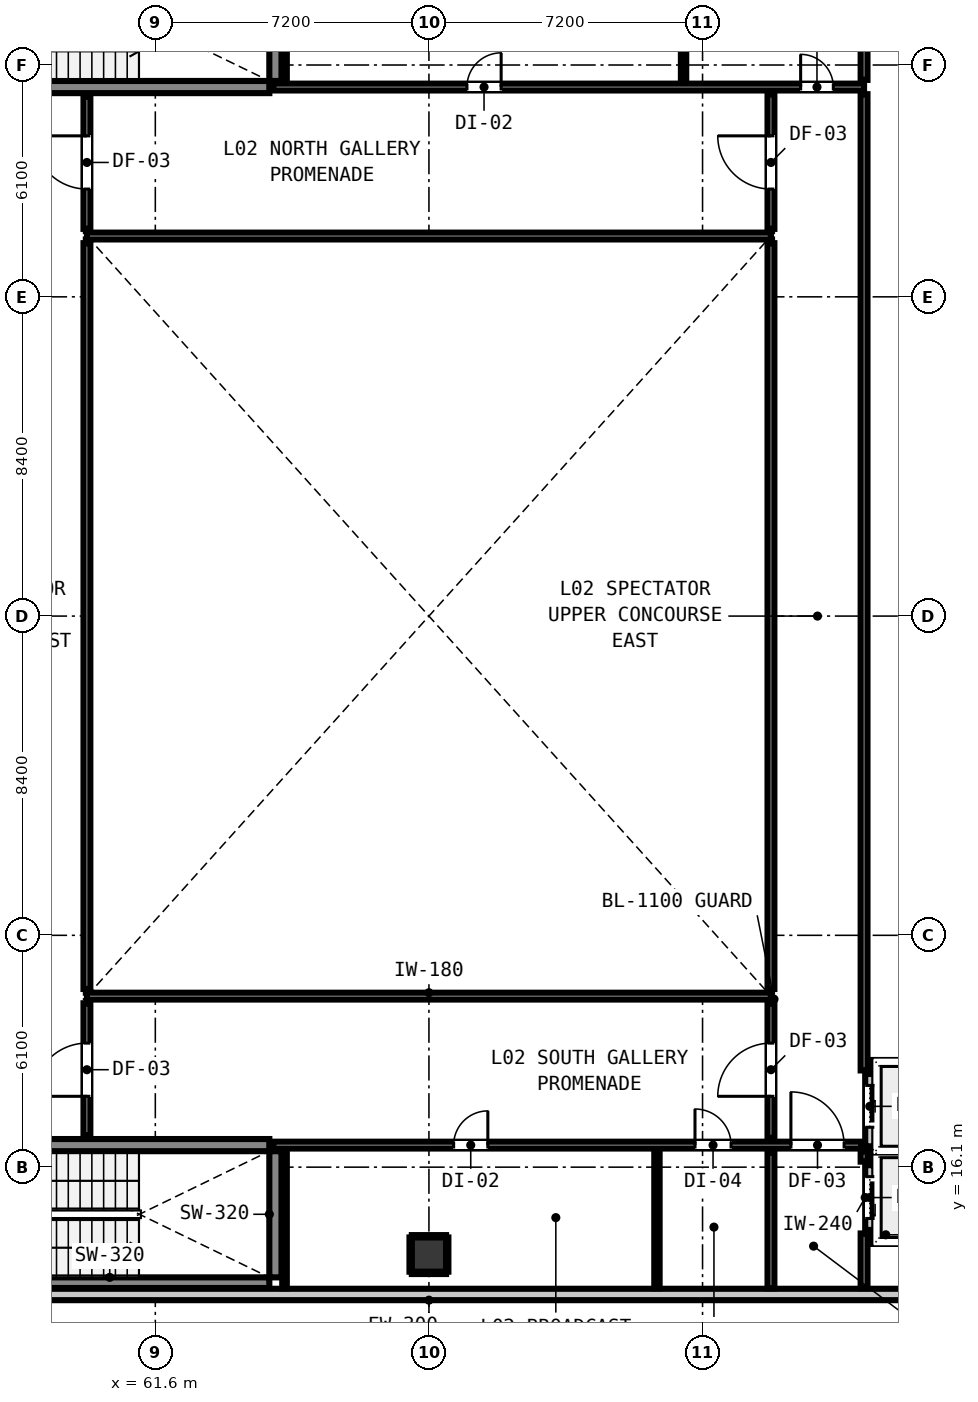
"""IFC4 building model, lengths in metres.
Left out: names, types, materials, properties, quantities, classifications, styles, units other than length and angle.
Written with IfcOpenShell. Run it as: python <this file> out.ifc"""

import sys

from ifc_helpers import new_model, si_unit, direction, frame, frame_2d, origin, origin_2d, place, context, subcontext, project, spatial, rectangle, circle, extrude, element, fill, save


model = new_model("IFC4")
c1 = context("Model", 3, precision=1e-05, world=origin(), true_north=direction((0.0, 1.0)))
c2 = subcontext(c1, "Body", "Model", "MODEL_VIEW")
j1 = project(units=[si_unit("LENGTHUNIT", "METRE"), si_unit("PLANEANGLEUNIT", "RADIAN")], contexts=[c1])
p1 = place(None, origin())
s1 = spatial("IfcSite", under=j1, at=p1, CompositionType="ELEMENT")
p2 = place(p1, origin())
s2 = spatial("IfcBuilding", under=s1, at=p2, CompositionType="ELEMENT")
p3 = place(p2, frame((0.0, 0.0, 9.4)))
s3 = spatial("IfcBuildingStorey", under=s2, at=p3, CompositionType="ELEMENT", Elevation=9.4)
p4 = place(p3, frame((64.76, 13.2, 0.0), z_axis=(0.0, 0.0, 1.0), x_axis=(0.0, 1.0, 0.0)))
e1 = element("IfcWall", 1, at=p4, inside=s3, PredefinedType="SHEAR", context=c2, shape_type="SweptSolid", body=[
    extrude(rectangle(XDim=3.32, YDim=0.32, at=frame_2d((1.66, 0.0))), origin(), (0.0, 0.0, 1.0), 4.2),
])
p5 = place(p3, frame((56.2, 13.06, 0.0), z_axis=(0.0, 0.0, 1.0), x_axis=(1.0, 0.0, 0.0)))
e2 = element("IfcWall", 2, at=p5, inside=s3, PredefinedType="SHEAR", context=c2, shape_type="SweptSolid", body=[
    extrude(rectangle(XDim=8.4, YDim=0.28, at=frame_2d((4.2, 0.0))), origin(), (0.0, 0.0, 1.0), 4.2),
])
p6 = place(p3, frame((56.2, 16.68, 0.0), z_axis=(0.0, 0.0, 1.0), x_axis=(1.0, 0.0, 0.0)))
e3 = element("IfcWall", 3, at=p6, inside=s3, PredefinedType="SHEAR", context=c2, shape_type="SweptSolid", body=[
    extrude(rectangle(XDim=8.4, YDim=0.32, at=frame_2d((4.2, 0.0))), origin(), (0.0, 0.0, 1.0), 4.2),
])
p7 = place(p6, frame((0.23, 0.0, 0.0)))
e4 = element("IfcOpeningElement", 4, at=p7, cuts=e3, PredefinedType="OPENING", context=c2, shape_type="SweptSolid", body=[
    extrude(rectangle(XDim=1.1, YDim=2.15, at=frame_2d((0.55, 1.075))), frame((0.0, 0.17, 0.0), z_axis=(0.0, -1.0, 0.0), x_axis=(1.0, 0.0, 0.0)), (0.0, 0.0, 1.0), 0.34),
])
p8 = place(p3, frame((64.76, 44.68, 0.0), z_axis=(0.0, 0.0, 1.0), x_axis=(0.0, 1.0, 0.0)))
e5 = element("IfcWall", 5, at=p8, inside=s3, PredefinedType="SHEAR", context=c2, shape_type="SweptSolid", body=[
    extrude(rectangle(XDim=3.32, YDim=0.32, at=frame_2d((1.66, 0.0))), origin(), (0.0, 0.0, 1.0), 4.2),
])
p9 = place(p3, frame((56.2, 44.52, 0.0), z_axis=(0.0, 0.0, 1.0), x_axis=(1.0, 0.0, 0.0)))
e6 = element("IfcWall", 6, at=p9, inside=s3, PredefinedType="SHEAR", context=c2, shape_type="SweptSolid", body=[
    extrude(rectangle(XDim=8.4, YDim=0.32, at=frame_2d((4.2, 0.0))), origin(), (0.0, 0.0, 1.0), 4.2),
])
p10 = place(p9, frame((0.23, 0.0, 0.0)))
e7 = element("IfcOpeningElement", 7, at=p10, cuts=e6, PredefinedType="OPENING", context=c2, shape_type="SweptSolid", body=[
    extrude(rectangle(XDim=1.1, YDim=2.15, at=frame_2d((0.55, 1.075))), frame((0.0, 0.17, 0.0), z_axis=(0.0, -1.0, 0.0), x_axis=(1.0, 0.0, 0.0)), (0.0, 0.0, 1.0), 0.34),
])
p11 = place(p3, frame((68.8, 13.8, 0.0), z_axis=(0.0, 0.0, 1.0), x_axis=(1.0, 0.0, 0.0)))
e8 = element("IfcColumn", 8, at=p11, inside=s3, PredefinedType="COLUMN", context=c2, shape_type="SweptSolid", body=[
    extrude(circle(Radius=0.45, at=origin_2d()), origin(), (0.0, 0.0, 1.0), 4.2),
])
p12 = place(p3, frame((83.05, 12.75, 0.0), z_axis=(0.0, 0.0, 1.0), x_axis=(-1.0, 0.0, 0.0)))
e9 = element("IfcWall", 9, at=p12, inside=s3, PredefinedType="STANDARD", context=c2, shape_type="SweptSolid", body=[
    extrude(rectangle(XDim=28.5, YDim=0.3, at=frame_2d((14.25, 0.0))), origin(), (0.0, 0.0, 1.0), 3.92),
])
p13 = place(p3, frame((80.4, 14.2, 0.0), z_axis=(0.0, 0.0, 1.0), x_axis=(1.0, 0.0, 0.0)))
e10 = element("IfcWall", 10, at=p13, inside=s3, PredefinedType="PARTITIONING", context=c2, shape_type="SweptSolid", body=[
    extrude(rectangle(XDim=0.843, YDim=0.24, at=frame_2d((0.421, 0.0))), origin(), (0.0, 0.0, 1.0), 3.155),
])
p14 = place(p3, frame((80.4, 16.4, 0.0), z_axis=(0.0, 0.0, 1.0), x_axis=(1.0, 0.0, 0.0)))
e11 = element("IfcWall", 11, at=p14, inside=s3, PredefinedType="PARTITIONING", context=c2, shape_type="SweptSolid", body=[
    extrude(rectangle(XDim=2.2, YDim=0.24, at=frame_2d((1.1, 0.0))), origin(), (0.0, 0.0, 1.0), 3.92),
])
p15 = place(p3, frame((80.4, 14.448, 0.0), z_axis=(0.0, 0.0, 1.0), x_axis=(0.0, 1.0, 0.0)))
e12 = element("IfcWall", 12, at=p15, inside=s3, PredefinedType="PARTITIONING", context=c2, shape_type="SweptSolid", body=[
    extrude(rectangle(XDim=1.704, YDim=0.24, at=frame_2d((0.852, 0.0))), origin(), (0.0, 0.0, 1.0), 3.92),
])
p16 = place(p15, frame((0.302, 0.0, 0.0)))
e13 = element("IfcOpeningElement", 13, at=p16, cuts=e12, PredefinedType="OPENING", context=c2, shape_type="SweptSolid", body=[
    extrude(rectangle(XDim=1.1, YDim=2.15, at=frame_2d((0.55, 1.075))), frame((0.0, 0.13, 0.0), z_axis=(0.0, -1.0, 0.0), x_axis=(1.0, 0.0, 0.0)), (0.0, 0.0, 1.0), 0.26),
])
p17 = place(p3, frame((80.4, 18.8, 0.0), z_axis=(0.0, 0.0, 1.0), x_axis=(1.0, 0.0, 0.0)))
e14 = element("IfcWall", 14, at=p17, inside=s3, PredefinedType="PARTITIONING", context=c2, shape_type="SweptSolid", body=[
    extrude(rectangle(XDim=2.2, YDim=0.24, at=frame_2d((1.1, 0.0))), origin(), (0.0, 0.0, 1.0), 3.92),
])
p18 = place(p3, frame((80.4, 16.648, 0.0), z_axis=(0.0, 0.0, 1.0), x_axis=(0.0, 1.0, 0.0)))
e15 = element("IfcWall", 15, at=p18, inside=s3, PredefinedType="PARTITIONING", context=c2, shape_type="SweptSolid", body=[
    extrude(rectangle(XDim=1.904, YDim=0.24, at=frame_2d((0.952, 0.0))), origin(), (0.0, 0.0, 1.0), 3.92),
])
p19 = place(p18, frame((0.502, 0.0, 0.0)))
e16 = element("IfcOpeningElement", 16, at=p19, cuts=e15, PredefinedType="OPENING", context=c2, shape_type="SweptSolid", body=[
    extrude(rectangle(XDim=1.1, YDim=2.15, at=frame_2d((0.55, 1.075))), frame((0.0, 0.13, 0.0), z_axis=(0.0, -1.0, 0.0), x_axis=(1.0, 0.0, 0.0)), (0.0, 0.0, 1.0), 0.26),
])
p20 = place(p3, frame((64.7, 16.68, 0.0), z_axis=(0.0, 0.0, 1.0), x_axis=(1.0, 0.0, 0.0)))
e17 = element("IfcWall", 17, at=p20, inside=s3, PredefinedType="PARTITIONING", context=c2, shape_type="SweptSolid", body=[
    extrude(rectangle(XDim=15.482, YDim=0.18, at=frame_2d((7.741, 0.0))), origin(), (0.0, 0.0, 1.0), 3.92),
])
p21 = place(p20, frame((13.625, 0.0, 0.0)))
e18 = element("IfcOpeningElement", 18, at=p21, cuts=e17, PredefinedType="OPENING", context=c2, shape_type="SweptSolid", body=[
    extrude(rectangle(XDim=1.4, YDim=2.15, at=frame_2d((0.7, 1.075))), frame((0.0, 0.1, 0.0), z_axis=(0.0, -1.0, 0.0), x_axis=(1.0, 0.0, 0.0)), (0.0, 0.0, 1.0), 0.2),
])
p22 = place(p20, frame((4.75, 0.0, 0.0)))
e19 = element("IfcOpeningElement", 19, at=p22, cuts=e17, PredefinedType="OPENING", context=c2, shape_type="SweptSolid", body=[
    extrude(rectangle(XDim=0.9, YDim=2.1, at=frame_2d((0.45, 1.05))), frame((0.0, 0.1, 0.0), z_axis=(0.0, -1.0, 0.0), x_axis=(1.0, 0.0, 0.0)), (0.0, 0.0, 1.0), 0.2),
])
p23 = place(p20, frame((11.101, 0.0, 0.0)))
e20 = element("IfcOpeningElement", 20, at=p23, cuts=e17, PredefinedType="OPENING", context=c2, shape_type="SweptSolid", body=[
    extrude(rectangle(XDim=0.95, YDim=2.1, at=frame_2d((0.475, 1.05))), frame((0.0, 0.1, 0.0), z_axis=(0.0, -1.0, 0.0), x_axis=(1.0, 0.0, 0.0)), (0.0, 0.0, 1.0), 0.2),
])
for number, where, z_axis, x_axis in (
    (21, (59.8, 20.6, 0.0), (0.0, 0.0, 1.0), (1.0, 0.0, 0.0)),
    (22, (59.8, 40.6, 0.0), (0.0, 0.0, 1.0), (1.0, 0.0, 0.0)),
):
    element("IfcWall", number, at=place(p3, frame(where, z_axis=z_axis, x_axis=x_axis)), inside=s3, PredefinedType="PARTITIONING", context=c2, shape_type="SweptSolid", body=[
        extrude(rectangle(XDim=18.0, YDim=0.18, at=frame_2d((9.0, 0.0))), origin(), (0.0, 0.0, 1.0), 3.92),
    ])
p24 = place(p3, frame((64.7, 44.52, 0.0), z_axis=(0.0, 0.0, 1.0), x_axis=(1.0, 0.0, 0.0)))
e23 = element("IfcWall", 23, at=p24, inside=s3, PredefinedType="PARTITIONING", context=c2, shape_type="SweptSolid", body=[
    extrude(rectangle(XDim=15.55, YDim=0.18, at=frame_2d((7.775, 0.0))), origin(), (0.0, 0.0, 1.0), 3.92),
])
p25 = place(p24, frame((5.1, 0.0, 0.0)))
e24 = element("IfcOpeningElement", 24, at=p25, cuts=e23, PredefinedType="OPENING", context=c2, shape_type="SweptSolid", body=[
    extrude(rectangle(XDim=0.9, YDim=2.1, at=frame_2d((0.45, 1.05))), frame((0.0, 0.1, 0.0), z_axis=(0.0, -1.0, 0.0), x_axis=(1.0, 0.0, 0.0)), (0.0, 0.0, 1.0), 0.2),
])
p26 = place(p24, frame((13.881, 0.0, 0.0)))
e25 = element("IfcOpeningElement", 25, at=p26, cuts=e23, PredefinedType="OPENING", context=c2, shape_type="SweptSolid", body=[
    extrude(rectangle(XDim=0.86, YDim=2.02, at=frame_2d((0.43, 1.01))), frame((0.0, 0.1, 0.0), z_axis=(0.0, -1.0, 0.0), x_axis=(1.0, 0.0, 0.0)), (0.0, 0.0, 1.0), 0.2),
])
p27 = place(p3, frame((59.8, 16.94, 0.0), z_axis=(0.0, 0.0, 1.0), x_axis=(0.0, 1.0, 0.0)))
e26 = element("IfcWall", 26, at=p27, inside=s3, PredefinedType="PARTITIONING", context=c2, shape_type="SweptSolid", body=[
    extrude(rectangle(XDim=3.472, YDim=0.18, at=frame_2d((1.736, 0.0))), origin(), (0.0, 0.0, 1.0), 3.92),
])
p28 = place(p27, frame((1.024, 0.0, 0.0)))
e27 = element("IfcOpeningElement", 27, at=p28, cuts=e26, PredefinedType="OPENING", context=c2, shape_type="SweptSolid", body=[
    extrude(rectangle(XDim=1.4, YDim=2.15, at=frame_2d((0.7, 1.075))), frame((0.0, 0.1, 0.0), z_axis=(0.0, -1.0, 0.0), x_axis=(1.0, 0.0, 0.0)), (0.0, 0.0, 1.0), 0.2),
])
p29 = place(p3, frame((59.8, 20.788, 0.0), z_axis=(0.0, 0.0, 1.0), x_axis=(0.0, 1.0, 0.0)))
e28 = element("IfcWall", 28, at=p29, inside=s3, PredefinedType="PARTITIONING", context=c2, shape_type="SweptSolid", body=[
    extrude(rectangle(XDim=19.624, YDim=0.18, at=frame_2d((9.812, 0.0))), origin(), (0.0, 0.0, 1.0), 3.92),
])
p30 = place(p3, frame((59.8, 40.788, 0.0), z_axis=(0.0, 0.0, 1.0), x_axis=(0.0, 1.0, 0.0)))
e29 = element("IfcWall", 29, at=p30, inside=s3, PredefinedType="PARTITIONING", context=c2, shape_type="SweptSolid", body=[
    extrude(rectangle(XDim=3.472, YDim=0.18, at=frame_2d((1.736, 0.0))), origin(), (0.0, 0.0, 1.0), 3.92),
])
p31 = place(p30, frame((1.048, 0.0, 0.0)))
e30 = element("IfcOpeningElement", 30, at=p31, cuts=e29, PredefinedType="OPENING", context=c2, shape_type="SweptSolid", body=[
    extrude(rectangle(XDim=1.4, YDim=2.15, at=frame_2d((0.7, 1.075))), frame((0.0, 0.1, 0.0), z_axis=(0.0, -1.0, 0.0), x_axis=(1.0, 0.0, 0.0)), (0.0, 0.0, 1.0), 0.2),
])
p32 = place(p3, frame((77.8, 12.912, 0.0), z_axis=(0.0, 0.0, 1.0), x_axis=(0.0, 1.0, 0.0)))
e31 = element("IfcWall", 31, at=p32, inside=s3, PredefinedType="PARTITIONING", context=c2, shape_type="SweptSolid", body=[
    extrude(rectangle(XDim=3.58, YDim=0.18, at=frame_2d((1.79, 0.0))), origin(), (0.0, 0.0, 1.0), 3.92),
])
p33 = place(p3, frame((77.8, 16.868, 0.0), z_axis=(0.0, 0.0, 1.0), x_axis=(0.0, 1.0, 0.0)))
e32 = element("IfcWall", 32, at=p33, inside=s3, PredefinedType="PARTITIONING", context=c2, shape_type="SweptSolid", body=[
    extrude(rectangle(XDim=3.544, YDim=0.18, at=frame_2d((1.772, 0.0))), origin(), (0.0, 0.0, 1.0), 3.92),
])
p34 = place(p33, frame((1.096, 0.0, 0.0)))
e33 = element("IfcOpeningElement", 33, at=p34, cuts=e32, PredefinedType="OPENING", context=c2, shape_type="SweptSolid", body=[
    extrude(rectangle(XDim=1.4, YDim=2.15, at=frame_2d((0.7, 1.075))), frame((0.0, 0.1, 0.0), z_axis=(0.0, -1.0, 0.0), x_axis=(1.0, 0.0, 0.0)), (0.0, 0.0, 1.0), 0.2),
])
p35 = place(p3, frame((77.8, 20.788, 0.0), z_axis=(0.0, 0.0, 1.0), x_axis=(0.0, 1.0, 0.0)))
e34 = element("IfcWall", 34, at=p35, inside=s3, PredefinedType="PARTITIONING", context=c2, shape_type="SweptSolid", body=[
    extrude(rectangle(XDim=19.624, YDim=0.18, at=frame_2d((9.812, 0.0))), origin(), (0.0, 0.0, 1.0), 3.92),
])
p36 = place(p3, frame((77.8, 40.788, 0.0), z_axis=(0.0, 0.0, 1.0), x_axis=(0.0, 1.0, 0.0)))
e35 = element("IfcWall", 35, at=p36, inside=s3, PredefinedType="PARTITIONING", context=c2, shape_type="SweptSolid", body=[
    extrude(rectangle(XDim=3.544, YDim=0.18, at=frame_2d((1.772, 0.0))), origin(), (0.0, 0.0, 1.0), 3.92),
])
p37 = place(p36, frame((1.048, 0.0, 0.0)))
e36 = element("IfcOpeningElement", 36, at=p37, cuts=e35, PredefinedType="OPENING", context=c2, shape_type="SweptSolid", body=[
    extrude(rectangle(XDim=1.4, YDim=2.15, at=frame_2d((0.7, 1.075))), frame((0.0, 0.1, 0.0), z_axis=(0.0, -1.0, 0.0), x_axis=(1.0, 0.0, 0.0)), (0.0, 0.0, 1.0), 0.2),
])
p38 = place(p3, frame((80.25, 12.912, 0.0), z_axis=(0.0, 0.0, 1.0), x_axis=(0.0, 1.0, 0.0)))
e37 = element("IfcWall", 37, at=p38, inside=s3, PredefinedType="PARTITIONING", context=c2, shape_type="SweptSolid", body=[
    extrude(rectangle(XDim=1.443, YDim=0.18, at=frame_2d((0.721, 0.0))), origin(), (0.0, 0.0, 1.0), 3.92),
])
p39 = place(p3, frame((80.25, 16.245, 0.0), z_axis=(0.0, 0.0, 1.0), x_axis=(0.0, 1.0, 0.0)))
e38 = element("IfcWall", 38, at=p39, inside=s3, PredefinedType="PARTITIONING", context=c2, shape_type="SweptSolid", body=[
    extrude(rectangle(XDim=0.275, YDim=0.18, at=frame_2d((0.137, 0.0))), origin(), (0.0, 0.0, 1.0), 3.92),
])
p40 = place(p3, frame((80.25, 18.645, 0.0), z_axis=(0.0, 0.0, 1.0), x_axis=(0.0, 1.0, 0.0)))
e39 = element("IfcWall", 39, at=p40, inside=s3, PredefinedType="PARTITIONING", context=c2, shape_type="SweptSolid", body=[
    extrude(rectangle(XDim=25.687, YDim=0.18, at=frame_2d((12.844, 0.0))), origin(), (0.0, 0.0, 1.0), 3.92),
])
p41 = place(p3, frame((80.25, 44.708, 0.0), z_axis=(0.0, 0.0, 1.0), x_axis=(0.0, 1.0, 0.0)))
e40 = element("IfcWall", 40, at=p41, inside=s3, PredefinedType="PARTITIONING", context=c2, shape_type="SweptSolid", body=[
    extrude(rectangle(XDim=3.58, YDim=0.18, at=frame_2d((1.79, 0.0))), origin(), (0.0, 0.0, 1.0), 3.92),
])
p42 = place(p3, frame((74.8, 12.912, 0.0), z_axis=(0.0, 0.0, 1.0), x_axis=(0.0, 1.0, 0.0)))
e41 = element("IfcWall", 41, at=p42, inside=s3, PredefinedType="PARTITIONING", context=c2, shape_type="SweptSolid", body=[
    extrude(rectangle(XDim=3.6, YDim=0.14, at=frame_2d((1.8, 0.0))), origin(), (0.0, 0.0, 1.0), 3.92),
])
p43 = place(p3, frame((75.5, 44.688, 0.0), z_axis=(0.0, 0.0, 1.0), x_axis=(0.0, 1.0, 0.0)))
e42 = element("IfcWall", 42, at=p43, inside=s3, PredefinedType="PARTITIONING", context=c2, shape_type="SweptSolid", body=[
    extrude(rectangle(XDim=3.6, YDim=0.14, at=frame_2d((1.8, 0.0))), origin(), (0.0, 0.0, 1.0), 3.92),
])
p44 = place(p3, frame((65.0, 12.912, 0.0), z_axis=(0.0, 0.0, 1.0), x_axis=(0.0, 1.0, 0.0)))
e43 = element("IfcWall", 43, at=p44, inside=s3, PredefinedType="PARTITIONING", context=c2, shape_type="SweptSolid", body=[
    extrude(rectangle(XDim=3.61, YDim=0.12, at=frame_2d((1.805, 0.0))), origin(), (0.0, 0.0, 1.0), 3.92),
])
p45 = place(p3, frame((65.0, 44.678, 0.0), z_axis=(0.0, 0.0, 1.0), x_axis=(0.0, 1.0, 0.0)))
e44 = element("IfcWall", 44, at=p45, inside=s3, PredefinedType="PARTITIONING", context=c2, shape_type="SweptSolid", body=[
    extrude(rectangle(XDim=3.61, YDim=0.12, at=frame_2d((1.805, 0.0))), origin(), (0.0, 0.0, 1.0), 3.92),
])
for number, where, z_axis, x_axis in (
    (45, (68.35, 13.318, 0.0), (0.0, 0.0, 1.0), (1.0, 0.0, 0.0)),
    (46, (68.35, 14.282, 0.0), (0.0, 0.0, 1.0), (1.0, 0.0, 0.0)),
    (47, (68.318, 13.35, 0.0), (0.0, 0.0, 1.0), (0.0, 1.0, 0.0)),
    (48, (69.282, 13.35, 0.0), (0.0, 0.0, 1.0), (0.0, 1.0, 0.0)),
):
    element("IfcWall", number, at=place(p3, frame(where, z_axis=z_axis, x_axis=x_axis)), inside=s3, PredefinedType="PARTITIONING", context=c2, shape_type="SweptSolid", body=[
        extrude(rectangle(XDim=0.9, YDim=0.06, at=frame_2d((0.45, 0.0))), origin(), (0.0, 0.0, 1.0), 1.45),
    ])
p46 = place(p16, origin())
e49 = element("IfcDoor", 49, at=p46, inside=s3, OperationType="SLIDING_TO_LEFT", PredefinedType="DOOR", context=c2, shape_type="SweptSolid", body=[
    extrude(rectangle(XDim=1.1, YDim=2.15, at=frame_2d((0.55, 1.075))), frame((0.0, 0.025, 0.0), z_axis=(0.0, -1.0, 0.0), x_axis=(1.0, 0.0, 0.0)), (0.0, 0.0, 1.0), 0.05),
])
fill(e13, e49)
p47 = place(p19, origin())
e50 = element("IfcDoor", 50, at=p47, inside=s3, OperationType="SLIDING_TO_RIGHT", PredefinedType="DOOR", context=c2, shape_type="SweptSolid", body=[
    extrude(rectangle(XDim=1.1, YDim=2.15, at=frame_2d((0.55, 1.075))), frame((0.0, 0.025, 0.0), z_axis=(0.0, -1.0, 0.0), x_axis=(1.0, 0.0, 0.0)), (0.0, 0.0, 1.0), 0.05),
])
fill(e16, e50)
p48 = place(p28, origin())
e51 = element("IfcDoor", 51, at=p48, inside=s3, OperationType="SINGLE_SWING_LEFT", PredefinedType="DOOR", context=c2, shape_type="SweptSolid", body=[
    extrude(rectangle(XDim=1.4, YDim=2.15, at=frame_2d((0.7, 1.075))), frame((0.0, 0.025, 0.0), z_axis=(0.0, -1.0, 0.0), x_axis=(1.0, 0.0, 0.0)), (0.0, 0.0, 1.0), 0.05),
])
fill(e27, e51)
p49 = place(p31, origin())
e52 = element("IfcDoor", 52, at=p49, inside=s3, OperationType="SINGLE_SWING_RIGHT", PredefinedType="DOOR", context=c2, shape_type="SweptSolid", body=[
    extrude(rectangle(XDim=1.4, YDim=2.15, at=frame_2d((0.7, 1.075))), frame((0.0, 0.025, 0.0), z_axis=(0.0, -1.0, 0.0), x_axis=(1.0, 0.0, 0.0)), (0.0, 0.0, 1.0), 0.05),
])
fill(e30, e52)
p50 = place(p34, origin())
e53 = element("IfcDoor", 53, at=p50, inside=s3, OperationType="SINGLE_SWING_LEFT", PredefinedType="DOOR", context=c2, shape_type="SweptSolid", body=[
    extrude(rectangle(XDim=1.4, YDim=2.15, at=frame_2d((0.7, 1.075))), frame((0.0, 0.025, 0.0), z_axis=(0.0, -1.0, 0.0), x_axis=(1.0, 0.0, 0.0)), (0.0, 0.0, 1.0), 0.05),
])
fill(e33, e53)
p51 = place(p37, origin())
e54 = element("IfcDoor", 54, at=p51, inside=s3, OperationType="SINGLE_SWING_RIGHT", PredefinedType="DOOR", context=c2, shape_type="SweptSolid", body=[
    extrude(rectangle(XDim=1.4, YDim=2.15, at=frame_2d((0.7, 1.075))), frame((0.0, 0.025, 0.0), z_axis=(0.0, -1.0, 0.0), x_axis=(1.0, 0.0, 0.0)), (0.0, 0.0, 1.0), 0.05),
])
fill(e36, e54)
p52 = place(p21, origin())
e55 = element("IfcDoor", 55, at=p52, inside=s3, OperationType="SINGLE_SWING_LEFT", PredefinedType="DOOR", context=c2, shape_type="SweptSolid", body=[
    extrude(rectangle(XDim=1.4, YDim=2.15, at=frame_2d((0.7, 1.075))), frame((0.0, 0.025, 0.0), z_axis=(0.0, -1.0, 0.0), x_axis=(1.0, 0.0, 0.0)), (0.0, 0.0, 1.0), 0.05),
])
fill(e18, e55)
p53 = place(p22, origin())
e56 = element("IfcDoor", 56, at=p53, inside=s3, OperationType="SINGLE_SWING_RIGHT", PredefinedType="DOOR", context=c2, shape_type="SweptSolid", body=[
    extrude(rectangle(XDim=0.9, YDim=2.1, at=frame_2d((0.45, 1.05))), frame((0.0, 0.025, 0.0), z_axis=(0.0, -1.0, 0.0), x_axis=(1.0, 0.0, 0.0)), (0.0, 0.0, 1.0), 0.05),
])
fill(e19, e56)
p54 = place(p23, origin())
e57 = element("IfcDoor", 57, at=p54, inside=s3, OperationType="SINGLE_SWING_LEFT", PredefinedType="DOOR", context=c2, shape_type="SweptSolid", body=[
    extrude(rectangle(XDim=0.95, YDim=2.1, at=frame_2d((0.475, 1.05))), frame((0.0, 0.025, 0.0), z_axis=(0.0, -1.0, 0.0), x_axis=(1.0, 0.0, 0.0)), (0.0, 0.0, 1.0), 0.05),
])
fill(e20, e57)
p55 = place(p25, origin())
e58 = element("IfcDoor", 58, at=p55, inside=s3, OperationType="SINGLE_SWING_RIGHT", PredefinedType="DOOR", context=c2, shape_type="SweptSolid", body=[
    extrude(rectangle(XDim=0.9, YDim=2.1, at=frame_2d((0.45, 1.05))), frame((0.0, 0.025, 0.0), z_axis=(0.0, -1.0, 0.0), x_axis=(1.0, 0.0, 0.0)), (0.0, 0.0, 1.0), 0.05),
])
fill(e24, e58)
p56 = place(p26, origin())
e59 = element("IfcDoor", 59, at=p56, inside=s3, OperationType="SINGLE_SWING_LEFT", PredefinedType="DOOR", context=c2, shape_type="SweptSolid", body=[
    extrude(rectangle(XDim=0.86, YDim=2.02, at=frame_2d((0.43, 1.01))), frame((0.0, 0.025, 0.0), z_axis=(0.0, -1.0, 0.0), x_axis=(1.0, 0.0, 0.0)), (0.0, 0.0, 1.0), 0.05),
])
fill(e25, e59)
save(model, sys.argv[1])
